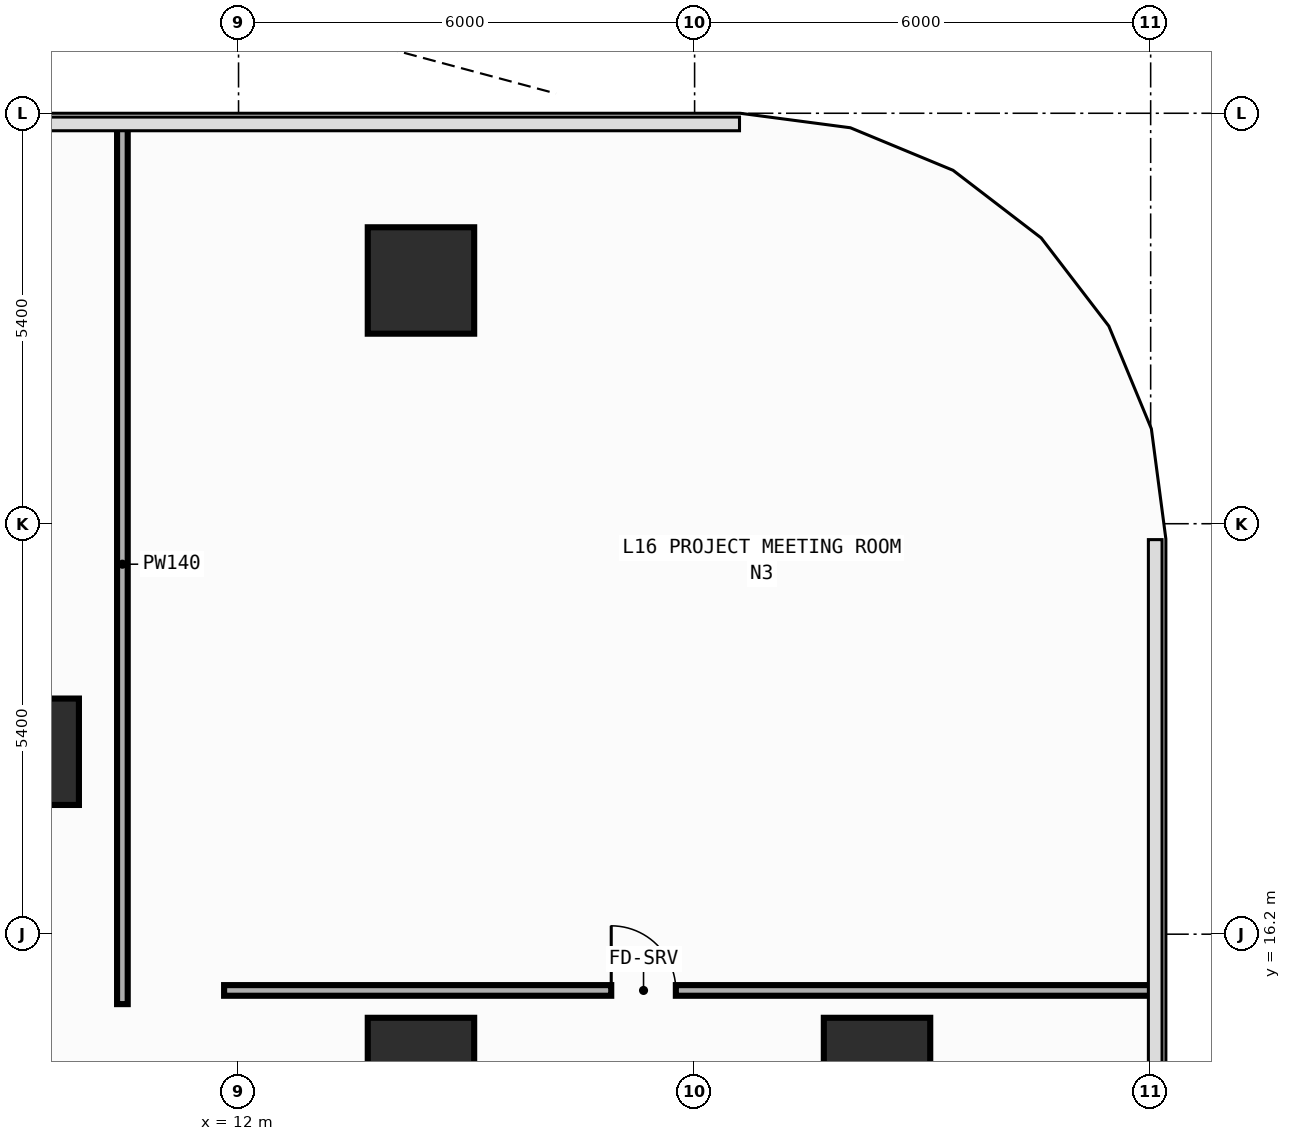
"""IFC4 building model, lengths in metres.
Left out: names, types, materials, properties, quantities, classifications, styles, units other than length and angle.
Written with IfcOpenShell. Run it as: python <this file> out.ifc"""

import sys

from ifc_helpers import new_model, si_unit, direction, frame, frame_2d, origin, origin_2d, place, context, subcontext, project, spatial, rectangle, extrude, element, fill, save


model = new_model("IFC4")
c1 = context("Model", 3, precision=1e-05, world=origin(), true_north=direction((0.0, 1.0)))
c2 = subcontext(c1, "Body", "Model", "MODEL_VIEW")
j1 = project(units=[si_unit("LENGTHUNIT", "METRE"), si_unit("PLANEANGLEUNIT", "RADIAN")], contexts=[c1])
p1 = place(None, origin())
s1 = spatial("IfcSite", under=j1, at=p1, CompositionType="ELEMENT")
p2 = place(p1, origin())
s2 = spatial("IfcBuilding", under=s1, at=p2, CompositionType="ELEMENT")
p3 = place(p2, frame((0.0, 0.0, 68.0)))
s3 = spatial("IfcBuildingStorey", under=s2, at=p3, CompositionType="ELEMENT", Elevation=68.0)
for number, where, z_axis, x_axis in (
    (1, (9.2, 18.6, 0.0), (0.0, 0.0, 1.0), (1.0, 0.0, 0.0)),
    (2, (20.4, 14.4, 0.0), (0.0, 0.0, 1.0), (1.0, 0.0, 0.0)),
    (3, (14.4, 14.4, 0.0), (0.0, 0.0, 1.0), (1.0, 0.0, 0.0)),
    (4, (14.4, 24.8, 0.0), (0.0, 0.0, 1.0), (1.0, 0.0, 0.0)),
):
    element("IfcColumn", number, at=place(p3, frame(where, z_axis=z_axis, x_axis=x_axis)), inside=s3, PredefinedType="COLUMN", context=c2, shape_type="SweptSolid", body=[
        extrude(rectangle(XDim=1.4, YDim=1.4, at=origin_2d()), origin(), (0.0, 0.0, 1.0), 4.2),
    ])
p4 = place(p3, frame((11.81, 15.46, 0.0), z_axis=(0.0, 0.0, 1.0), x_axis=(1.0, 0.0, 0.0)))
e5 = element("IfcWall", 5, at=p4, inside=s3, PredefinedType="PARTITIONING", context=c2, shape_type="SweptSolid", body=[
    extrude(rectangle(XDim=12.245, YDim=0.14, at=frame_2d((6.123, 0.0))), origin(), (0.0, 0.0, 1.0), 3.94),
])
p5 = place(p4, frame((5.093, 0.0, 0.0)))
e6 = element("IfcOpeningElement", 6, at=p5, cuts=e5, PredefinedType="OPENING", context=c2, shape_type="SweptSolid", body=[
    extrude(rectangle(XDim=0.85, YDim=2.1, at=frame_2d((0.425, 1.05))), frame((0.0, 0.08, 0.0), z_axis=(0.0, -1.0, 0.0), x_axis=(1.0, 0.0, 0.0)), (0.0, 0.0, 1.0), 0.16),
])
p6 = place(p3, frame((10.472, 15.28, 0.0), z_axis=(0.0, 0.0, 1.0), x_axis=(0.0, 1.0, 0.0)))
e7 = element("IfcWall", 7, at=p6, inside=s3, PredefinedType="PARTITIONING", context=c2, shape_type="SweptSolid", body=[
    extrude(rectangle(XDim=11.575, YDim=0.14, at=frame_2d((5.788, 0.0))), origin(), (0.0, 0.0, 1.0), 3.94),
])
p7 = place(p5, origin())
e8 = element("IfcDoor", 8, at=p7, inside=s3, OperationType="SINGLE_SWING_LEFT", PredefinedType="DOOR", context=c2, shape_type="SweptSolid", body=[
    extrude(rectangle(XDim=0.85, YDim=2.1, at=frame_2d((0.425, 1.05))), frame((0.0, 0.025, 0.0), z_axis=(0.0, -1.0, 0.0), x_axis=(1.0, 0.0, 0.0)), (0.0, 0.0, 1.0), 0.05),
])
fill(e6, e8)
save(model, sys.argv[1])
